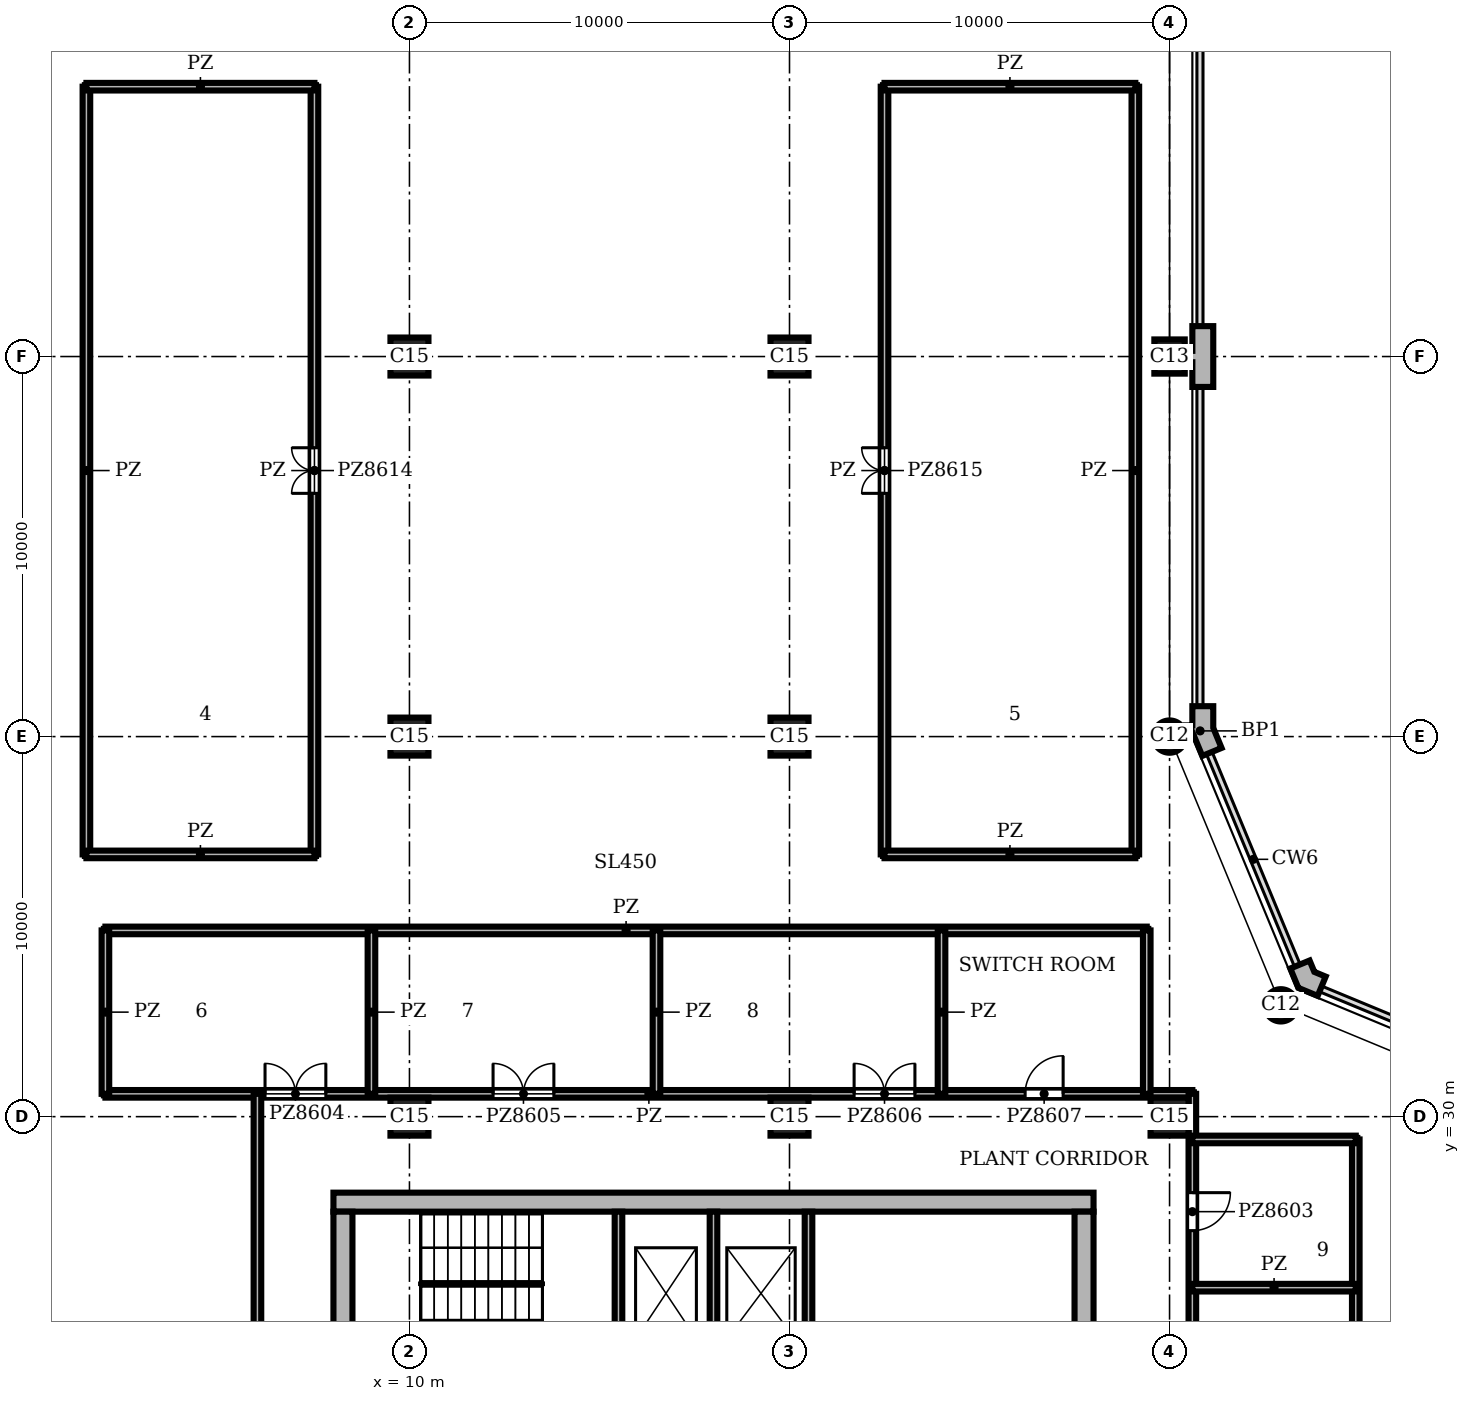
"""IFC4 building model, lengths in metres.
Left out: names, types, materials, properties, quantities, classifications, styles, units other than length and angle.
Written with IfcOpenShell. Run it as: python <this file> out.ifc"""

import sys

from ifc_helpers import new_model, si_unit, direction, frame, frame_2d, origin, origin_2d, place, context, subcontext, project, spatial, polyline, rectangle, circle, outline, extrude, element, fill, save


model = new_model("IFC4")
c1 = context("Model", 3, precision=1e-05, world=origin(), true_north=direction((0.0, 1.0)))
c2 = subcontext(c1, "Body", "Model", "MODEL_VIEW")
j1 = project(units=[si_unit("LENGTHUNIT", "METRE"), si_unit("PLANEANGLEUNIT", "RADIAN")], contexts=[c1])
p1 = place(None, origin())
s1 = spatial("IfcSite", under=j1, at=p1, CompositionType="ELEMENT")
p2 = place(p1, origin())
s2 = spatial("IfcBuilding", under=s1, at=p2, CompositionType="ELEMENT")
p3 = place(p2, frame((0.0, 0.0, 352.8)))
s3 = spatial("IfcBuildingStorey", under=s2, at=p3, CompositionType="ELEMENT", Elevation=352.8)
for number, where, z_axis, x_axis in (
    (1, (32.929, 32.929, 0.0), (0.0, 0.0, 1.0), (1.0, 0.0, 0.0)),
    (2, (30.0, 40.0, 0.0), (0.0, 0.0, 1.0), (1.0, 0.0, 0.0)),
):
    element("IfcColumn", number, at=place(p3, frame(where, z_axis=z_axis, x_axis=x_axis)), inside=s3, PredefinedType="COLUMN", context=c2, shape_type="SweptSolid", body=[
        extrude(circle(Radius=0.425, at=origin_2d()), origin(), (0.0, 0.0, 1.0), 5.4),
    ])
p4 = place(p3, frame((30.0, 50.0, 0.0), z_axis=(0.0, 0.0, 1.0), x_axis=(0.0, 1.0, 0.0)))
e3 = element("IfcColumn", 3, at=p4, inside=s3, PredefinedType="COLUMN", context=c2, shape_type="SweptSolid", body=[
    extrude(rectangle(XDim=0.9, YDim=0.8, at=origin_2d()), origin(), (0.0, 0.0, 1.0), 5.4),
])
for number, where, z_axis, x_axis in (
    (4, (10.0, 30.0, 0.0), (0.0, 0.0, 1.0), (1.0, 0.0, 0.0)),
    (5, (10.0, 40.0, 0.0), (0.0, 0.0, 1.0), (1.0, 0.0, 0.0)),
    (6, (10.0, 50.0, 0.0), (0.0, 0.0, 1.0), (1.0, 0.0, 0.0)),
    (7, (20.0, 30.0, 0.0), (0.0, 0.0, 1.0), (1.0, 0.0, 0.0)),
    (8, (20.0, 40.0, 0.0), (0.0, 0.0, 1.0), (1.0, 0.0, 0.0)),
    (9, (20.0, 50.0, 0.0), (0.0, 0.0, 1.0), (1.0, 0.0, 0.0)),
    (10, (30.0, 30.0, 0.0), (0.0, 0.0, 1.0), (1.0, 0.0, 0.0)),
):
    element("IfcColumn", number, at=place(p3, frame(where, z_axis=z_axis, x_axis=x_axis)), inside=s3, PredefinedType="COLUMN", context=c2, shape_type="SweptSolid", body=[
        extrude(rectangle(XDim=1.0, YDim=1.0, at=origin_2d()), origin(), (0.0, 0.0, 1.0), 5.4),
    ])
p5 = place(p3, frame((27.75, 8.5, 0.0), z_axis=(0.0, 0.0, 1.0), x_axis=(0.0, 1.0, 0.0)))
e11 = element("IfcWall", 11, at=p5, inside=s3, PredefinedType="SHEAR", context=c2, shape_type="SweptSolid", body=[
    extrude(rectangle(XDim=19.0, YDim=0.5, at=frame_2d((9.5, 0.0))), origin(), (0.0, 0.0, 1.0), 5.4),
])
p6 = place(p5, frame((4.95, 0.0, 0.0)))
e12 = element("IfcOpeningElement", 12, at=p6, cuts=e11, PredefinedType="OPENING", context=c2, shape_type="SweptSolid", body=[
    extrude(rectangle(XDim=1.6, YDim=2.1, at=frame_2d((0.8, 1.05))), frame((0.0, 0.26, 0.0), z_axis=(0.0, -1.0, 0.0), x_axis=(1.0, 0.0, 0.0)), (0.0, 0.0, 1.0), 0.52),
])
p7 = place(p3, frame((28.0, 27.75, 0.0), z_axis=(0.0, 0.0, 1.0), x_axis=(-1.0, 0.0, 0.0)))
e13 = element("IfcWall", 13, at=p7, inside=s3, PredefinedType="SHEAR", context=c2, shape_type="SweptSolid", body=[
    extrude(rectangle(XDim=20.0, YDim=0.5, at=frame_2d((10.0, 0.0))), origin(), (0.0, 0.0, 1.0), 5.4),
])
p8 = place(p3, frame((8.25, 27.5, 0.0), z_axis=(0.0, 0.0, 1.0), x_axis=(0.0, -1.0, 0.0)))
e14 = element("IfcWall", 14, at=p8, inside=s3, PredefinedType="SHEAR", context=c2, shape_type="SweptSolid", body=[
    extrude(rectangle(XDim=19.0, YDim=0.5, at=frame_2d((9.5, 0.0))), origin(), (0.0, 0.0, 1.0), 5.4),
])
p9 = place(p3, origin())
e15 = element("IfcWall", 15, at=p9, inside=s3, PredefinedType="SOLIDWALL", context=c2, shape_type="SweptSolid", body=[
    extrude(outline(polyline([(34.051, 33.547), (34.108, 33.685), (33.809, 33.809), (33.685, 34.108), (33.547, 34.051), (33.177, 33.898), (33.388, 33.388), (33.898, 33.177), (34.051, 33.547)])), origin(), (0.0, 0.0, 1.0), 5.4),
])
e16 = element("IfcWall", 16, at=p9, inside=s3, PredefinedType="SOLIDWALL", context=c2, shape_type="SweptSolid", body=[
    extrude(outline(polyline([(30.62, 39.995), (30.62, 40.071), (30.861, 39.49), (31.23, 39.644), (31.369, 39.701), (31.15, 40.229), (31.15, 40.8), (31.0, 40.8), (30.6, 40.8), (30.6, 40.295), (30.425, 40.295), (30.425, 39.995), (30.62, 39.995)])), origin(), (0.0, 0.0, 1.0), 5.4),
])
e17 = element("IfcWall", 17, at=p9, inside=s3, PredefinedType="SOLIDWALL", context=c2, shape_type="SweptSolid", body=[
    extrude(outline(polyline([(30.0, 49.85), (30.6, 49.85), (30.6, 49.2), (31.0, 49.2), (31.15, 49.2), (31.15, 50.0), (31.15, 50.8), (31.0, 50.8), (30.6, 50.8), (30.6, 50.15), (30.0, 50.15), (30.0, 49.85)])), origin(), (0.0, 0.0, 1.0), 5.4),
])
p10 = place(p3, frame((15.5, 23.6, 0.0), z_axis=(0.0, 0.0, 1.0), x_axis=(0.0, 1.0, 0.0)))
e18 = element("IfcWall", 18, at=p10, inside=s3, PredefinedType="SHEAR", context=c2, shape_type="SweptSolid", body=[
    extrude(rectangle(XDim=3.9, YDim=0.2, at=frame_2d((1.95, 0.0))), origin(), (0.0, 0.0, 1.0), 5.0),
])
p11 = place(p3, frame((18.0, 20.0, 0.0), z_axis=(0.0, 0.0, 1.0), x_axis=(0.0, 1.0, 0.0)))
e19 = element("IfcWall", 19, at=p11, inside=s3, PredefinedType="SHEAR", context=c2, shape_type="SweptSolid", body=[
    extrude(rectangle(XDim=7.5, YDim=0.2, at=frame_2d((3.75, 0.0))), origin(), (0.0, 0.0, 1.0), 5.0),
])
p12 = place(p11, frame((1.2, 0.0, 0.0)))
e20 = element("IfcOpeningElement", 20, at=p12, cuts=e19, PredefinedType="OPENING", context=c2, shape_type="SweptSolid", body=[
    extrude(rectangle(XDim=1.2, YDim=2.1, at=frame_2d((0.6, 1.05))), frame((0.0, 0.11, 0.0), z_axis=(0.0, -1.0, 0.0), x_axis=(1.0, 0.0, 0.0)), (0.0, 0.0, 1.0), 0.22),
])
p13 = place(p3, frame((20.5, 23.6, 0.0), z_axis=(0.0, 0.0, 1.0), x_axis=(0.0, 1.0, 0.0)))
e21 = element("IfcWall", 21, at=p13, inside=s3, PredefinedType="SHEAR", context=c2, shape_type="SweptSolid", body=[
    extrude(rectangle(XDim=3.9, YDim=0.2, at=frame_2d((1.95, 0.0))), origin(), (0.0, 0.0, 1.0), 5.0),
])
for number, where, z_axis, x_axis in (
    (22, (1.5, 36.9, 0.0), (0.0, 0.0, 1.0), (1.0, 0.0, 0.0)),
    (23, (1.5, 57.1, 0.0), (0.0, 0.0, 1.0), (1.0, 0.0, 0.0)),
):
    element("IfcWall", number, at=place(p3, frame(where, z_axis=z_axis, x_axis=x_axis)), inside=s3, PredefinedType="PARTITIONING", context=c2, shape_type="SweptSolid", body=[
        extrude(rectangle(XDim=6.0, YDim=0.2, at=frame_2d((3.0, 0.0))), origin(), (0.0, 0.0, 1.0), 5.0),
    ])
p14 = place(p3, frame((2.0, 30.6, 0.0), z_axis=(0.0, 0.0, 1.0), x_axis=(1.0, 0.0, 0.0)))
e24 = element("IfcWall", 24, at=p14, inside=s3, PredefinedType="PARTITIONING", context=c2, shape_type="SweptSolid", body=[
    extrude(rectangle(XDim=28.6, YDim=0.2, at=frame_2d((14.3, 0.0))), origin(), (0.0, 0.0, 1.0), 5.0),
])
p15 = place(p14, frame((4.2, 0.0, 0.0)))
e25 = element("IfcOpeningElement", 25, at=p15, cuts=e24, PredefinedType="OPENING", context=c2, shape_type="SweptSolid", body=[
    extrude(rectangle(XDim=1.6, YDim=2.1, at=frame_2d((0.8, 1.05))), frame((0.0, 0.11, 0.0), z_axis=(0.0, -1.0, 0.0), x_axis=(1.0, 0.0, 0.0)), (0.0, 0.0, 1.0), 0.22),
])
p16 = place(p14, frame((10.2, 0.0, 0.0)))
e26 = element("IfcOpeningElement", 26, at=p16, cuts=e24, PredefinedType="OPENING", context=c2, shape_type="SweptSolid", body=[
    extrude(rectangle(XDim=1.6, YDim=2.1, at=frame_2d((0.8, 1.05))), frame((0.0, 0.11, 0.0), z_axis=(0.0, -1.0, 0.0), x_axis=(1.0, 0.0, 0.0)), (0.0, 0.0, 1.0), 0.22),
])
p17 = place(p14, frame((19.7, 0.0, 0.0)))
e27 = element("IfcOpeningElement", 27, at=p17, cuts=e24, PredefinedType="OPENING", context=c2, shape_type="SweptSolid", body=[
    extrude(rectangle(XDim=1.6, YDim=2.1, at=frame_2d((0.8, 1.05))), frame((0.0, 0.11, 0.0), z_axis=(0.0, -1.0, 0.0), x_axis=(1.0, 0.0, 0.0)), (0.0, 0.0, 1.0), 0.22),
])
p18 = place(p14, frame((24.2, 0.0, 0.0)))
e28 = element("IfcOpeningElement", 28, at=p18, cuts=e24, PredefinedType="OPENING", context=c2, shape_type="SweptSolid", body=[
    extrude(rectangle(XDim=1.0, YDim=2.1, at=frame_2d((0.5, 1.05))), frame((0.0, 0.11, 0.0), z_axis=(0.0, -1.0, 0.0), x_axis=(1.0, 0.0, 0.0)), (0.0, 0.0, 1.0), 0.22),
])
p19 = place(p3, frame((2.0, 34.9, 0.0), z_axis=(0.0, 0.0, 1.0), x_axis=(1.0, 0.0, 0.0)))
e29 = element("IfcWall", 29, at=p19, inside=s3, PredefinedType="PARTITIONING", context=c2, shape_type="SweptSolid", body=[
    extrude(rectangle(XDim=27.4, YDim=0.2, at=frame_2d((13.7, 0.0))), origin(), (0.0, 0.0, 1.0), 5.0),
])
for number, where, z_axis, x_axis in (
    (30, (22.5, 36.9, 0.0), (0.0, 0.0, 1.0), (1.0, 0.0, 0.0)),
    (31, (22.5, 57.1, 0.0), (0.0, 0.0, 1.0), (1.0, 0.0, 0.0)),
):
    element("IfcWall", number, at=place(p3, frame(where, z_axis=z_axis, x_axis=x_axis)), inside=s3, PredefinedType="PARTITIONING", context=c2, shape_type="SweptSolid", body=[
        extrude(rectangle(XDim=6.6, YDim=0.2, at=frame_2d((3.3, 0.0))), origin(), (0.0, 0.0, 1.0), 5.0),
    ])
for number, where, z_axis, x_axis in (
    (32, (30.6, 25.5, 0.0), (0.0, 0.0, 1.0), (1.0, 0.0, 0.0)),
    (33, (30.6, 29.4, 0.0), (0.0, 0.0, 1.0), (1.0, 0.0, 0.0)),
):
    element("IfcWall", number, at=place(p3, frame(where, z_axis=z_axis, x_axis=x_axis)), inside=s3, PredefinedType="PARTITIONING", context=c2, shape_type="SweptSolid", body=[
        extrude(rectangle(XDim=4.3, YDim=0.2, at=frame_2d((2.15, 0.0))), origin(), (0.0, 0.0, 1.0), 5.0),
    ])
p20 = place(p3, frame((1.5, 36.9, 0.0), z_axis=(0.0, 0.0, 1.0), x_axis=(0.0, 1.0, 0.0)))
e34 = element("IfcWall", 34, at=p20, inside=s3, PredefinedType="PARTITIONING", context=c2, shape_type="SweptSolid", body=[
    extrude(rectangle(XDim=20.2, YDim=0.2, at=frame_2d((10.1, 0.0))), origin(), (0.0, 0.0, 1.0), 5.0),
])
p21 = place(p3, frame((2.0, 30.6, 0.0), z_axis=(0.0, 0.0, 1.0), x_axis=(0.0, 1.0, 0.0)))
e35 = element("IfcWall", 35, at=p21, inside=s3, PredefinedType="PARTITIONING", context=c2, shape_type="SweptSolid", body=[
    extrude(rectangle(XDim=4.3, YDim=0.2, at=frame_2d((2.15, 0.0))), origin(), (0.0, 0.0, 1.0), 5.0),
])
p22 = place(p3, frame((6.0, 14.0, 0.0), z_axis=(0.0, 0.0, 1.0), x_axis=(0.0, 1.0, 0.0)))
e36 = element("IfcWall", 36, at=p22, inside=s3, PredefinedType="PARTITIONING", context=c2, shape_type="SweptSolid", body=[
    extrude(rectangle(XDim=16.6, YDim=0.2, at=frame_2d((8.3, 0.0))), origin(), (0.0, 0.0, 1.0), 5.0),
])
p23 = place(p3, frame((7.5, 36.9, 0.0), z_axis=(0.0, 0.0, 1.0), x_axis=(0.0, 1.0, 0.0)))
e37 = element("IfcWall", 37, at=p23, inside=s3, PredefinedType="PARTITIONING", context=c2, shape_type="SweptSolid", body=[
    extrude(rectangle(XDim=20.2, YDim=0.2, at=frame_2d((10.1, 0.0))), origin(), (0.0, 0.0, 1.0), 5.0),
])
p24 = place(p23, frame((9.5, 0.0, 0.0)))
e38 = element("IfcOpeningElement", 38, at=p24, cuts=e37, PredefinedType="OPENING", context=c2, shape_type="SweptSolid", body=[
    extrude(rectangle(XDim=1.2, YDim=2.1, at=frame_2d((0.6, 1.05))), frame((0.0, 0.11, 0.0), z_axis=(0.0, -1.0, 0.0), x_axis=(1.0, 0.0, 0.0)), (0.0, 0.0, 1.0), 0.22),
])
for number, where, z_axis, x_axis in (
    (39, (9.0, 30.6, 0.0), (0.0, 0.0, 1.0), (0.0, 1.0, 0.0)),
    (40, (16.5, 30.6, 0.0), (0.0, 0.0, 1.0), (0.0, 1.0, 0.0)),
):
    element("IfcWall", number, at=place(p3, frame(where, z_axis=z_axis, x_axis=x_axis)), inside=s3, PredefinedType="PARTITIONING", context=c2, shape_type="SweptSolid", body=[
        extrude(rectangle(XDim=4.3, YDim=0.2, at=frame_2d((2.15, 0.0))), origin(), (0.0, 0.0, 1.0), 5.0),
    ])
p25 = place(p3, frame((22.5, 36.9, 0.0), z_axis=(0.0, 0.0, 1.0), x_axis=(0.0, 1.0, 0.0)))
e41 = element("IfcWall", 41, at=p25, inside=s3, PredefinedType="PARTITIONING", context=c2, shape_type="SweptSolid", body=[
    extrude(rectangle(XDim=20.2, YDim=0.2, at=frame_2d((10.1, 0.0))), origin(), (0.0, 0.0, 1.0), 5.0),
])
p26 = place(p25, frame((9.5, 0.0, 0.0)))
e42 = element("IfcOpeningElement", 42, at=p26, cuts=e41, PredefinedType="OPENING", context=c2, shape_type="SweptSolid", body=[
    extrude(rectangle(XDim=1.2, YDim=2.1, at=frame_2d((0.6, 1.05))), frame((0.0, 0.11, 0.0), z_axis=(0.0, -1.0, 0.0), x_axis=(1.0, 0.0, 0.0)), (0.0, 0.0, 1.0), 0.22),
])
p27 = place(p3, frame((24.0, 30.6, 0.0), z_axis=(0.0, 0.0, 1.0), x_axis=(0.0, 1.0, 0.0)))
e43 = element("IfcWall", 43, at=p27, inside=s3, PredefinedType="PARTITIONING", context=c2, shape_type="SweptSolid", body=[
    extrude(rectangle(XDim=4.3, YDim=0.2, at=frame_2d((2.15, 0.0))), origin(), (0.0, 0.0, 1.0), 5.0),
])
p28 = place(p3, frame((29.1, 36.9, 0.0), z_axis=(0.0, 0.0, 1.0), x_axis=(0.0, 1.0, 0.0)))
e44 = element("IfcWall", 44, at=p28, inside=s3, PredefinedType="PARTITIONING", context=c2, shape_type="SweptSolid", body=[
    extrude(rectangle(XDim=20.2, YDim=0.2, at=frame_2d((10.1, 0.0))), origin(), (0.0, 0.0, 1.0), 5.0),
])
p29 = place(p3, frame((29.4, 30.6, 0.0), z_axis=(0.0, 0.0, 1.0), x_axis=(0.0, 1.0, 0.0)))
e45 = element("IfcWall", 45, at=p29, inside=s3, PredefinedType="PARTITIONING", context=c2, shape_type="SweptSolid", body=[
    extrude(rectangle(XDim=4.3, YDim=0.2, at=frame_2d((2.15, 0.0))), origin(), (0.0, 0.0, 1.0), 5.0),
])
p30 = place(p3, frame((30.6, 8.1, 0.0), z_axis=(0.0, 0.0, 1.0), x_axis=(0.0, 1.0, 0.0)))
e46 = element("IfcWall", 46, at=p30, inside=s3, PredefinedType="PARTITIONING", context=c2, shape_type="SweptSolid", body=[
    extrude(rectangle(XDim=22.5, YDim=0.2, at=frame_2d((11.25, 0.0))), origin(), (0.0, 0.0, 1.0), 5.0),
])
p31 = place(p30, frame((5.1, 0.0, 0.0)))
e47 = element("IfcOpeningElement", 47, at=p31, cuts=e46, PredefinedType="OPENING", context=c2, shape_type="SweptSolid", body=[
    extrude(rectangle(XDim=1.6, YDim=2.1, at=frame_2d((0.8, 1.05))), frame((0.0, 0.11, 0.0), z_axis=(0.0, -1.0, 0.0), x_axis=(1.0, 0.0, 0.0)), (0.0, 0.0, 1.0), 0.22),
])
p32 = place(p30, frame((14.5, 0.0, 0.0)))
e48 = element("IfcOpeningElement", 48, at=p32, cuts=e46, PredefinedType="OPENING", context=c2, shape_type="SweptSolid", body=[
    extrude(rectangle(XDim=1.2, YDim=2.1, at=frame_2d((0.6, 1.05))), frame((0.0, 0.11, 0.0), z_axis=(0.0, -1.0, 0.0), x_axis=(1.0, 0.0, 0.0)), (0.0, 0.0, 1.0), 0.22),
])
p33 = place(p30, frame((18.9, 0.0, 0.0)))
e49 = element("IfcOpeningElement", 49, at=p33, cuts=e46, PredefinedType="OPENING", context=c2, shape_type="SweptSolid", body=[
    extrude(rectangle(XDim=1.0, YDim=2.1, at=frame_2d((0.5, 1.05))), frame((0.0, 0.11, 0.0), z_axis=(0.0, -1.0, 0.0), x_axis=(1.0, 0.0, 0.0)), (0.0, 0.0, 1.0), 0.22),
])
p34 = place(p3, frame((34.9, 8.1, 0.0), z_axis=(0.0, 0.0, 1.0), x_axis=(0.0, 1.0, 0.0)))
e50 = element("IfcWall", 50, at=p34, inside=s3, PredefinedType="PARTITIONING", context=c2, shape_type="SweptSolid", body=[
    extrude(rectangle(XDim=21.3, YDim=0.2, at=frame_2d((10.65, 0.0))), origin(), (0.0, 0.0, 1.0), 5.0),
])
p35 = place(p33, frame((1.0, 0.0, 0.0), z_axis=(0.0, 0.0, 1.0), x_axis=(-1.0, 0.0, 0.0)))
e51 = element("IfcDoor", 51, at=p35, inside=s3, OperationType="SINGLE_SWING_LEFT", PredefinedType="DOOR", context=c2, shape_type="SweptSolid", body=[
    extrude(rectangle(XDim=1.0, YDim=2.1, at=frame_2d((0.5, 1.05))), frame((0.0, 0.025, 0.0), z_axis=(0.0, -1.0, 0.0), x_axis=(1.0, 0.0, 0.0)), (0.0, 0.0, 1.0), 0.05),
])
fill(e49, e51)
p36 = place(p15, origin())
e52 = element("IfcDoor", 52, at=p36, inside=s3, OperationType="DOUBLE_DOOR_DOUBLE_SWING", PredefinedType="DOOR", context=c2, shape_type="SweptSolid", body=[
    extrude(rectangle(XDim=1.6, YDim=2.1, at=frame_2d((0.8, 1.05))), frame((0.0, 0.025, 0.0), z_axis=(0.0, -1.0, 0.0), x_axis=(1.0, 0.0, 0.0)), (0.0, 0.0, 1.0), 0.05),
])
fill(e25, e52)
p37 = place(p16, origin())
e53 = element("IfcDoor", 53, at=p37, inside=s3, OperationType="DOUBLE_DOOR_DOUBLE_SWING", PredefinedType="DOOR", context=c2, shape_type="SweptSolid", body=[
    extrude(rectangle(XDim=1.6, YDim=2.1, at=frame_2d((0.8, 1.05))), frame((0.0, 0.025, 0.0), z_axis=(0.0, -1.0, 0.0), x_axis=(1.0, 0.0, 0.0)), (0.0, 0.0, 1.0), 0.05),
])
fill(e26, e53)
p38 = place(p17, origin())
e54 = element("IfcDoor", 54, at=p38, inside=s3, OperationType="DOUBLE_DOOR_DOUBLE_SWING", PredefinedType="DOOR", context=c2, shape_type="SweptSolid", body=[
    extrude(rectangle(XDim=1.6, YDim=2.1, at=frame_2d((0.8, 1.05))), frame((0.0, 0.025, 0.0), z_axis=(0.0, -1.0, 0.0), x_axis=(1.0, 0.0, 0.0)), (0.0, 0.0, 1.0), 0.05),
])
fill(e27, e54)
p39 = place(p18, origin())
e55 = element("IfcDoor", 55, at=p39, inside=s3, OperationType="SINGLE_SWING_RIGHT", PredefinedType="DOOR", context=c2, shape_type="SweptSolid", body=[
    extrude(rectangle(XDim=1.0, YDim=2.1, at=frame_2d((0.5, 1.05))), frame((0.0, 0.025, 0.0), z_axis=(0.0, -1.0, 0.0), x_axis=(1.0, 0.0, 0.0)), (0.0, 0.0, 1.0), 0.05),
])
fill(e28, e55)
p40 = place(p24, origin())
e56 = element("IfcDoor", 56, at=p40, inside=s3, OperationType="DOUBLE_DOOR_SINGLE_SWING", PredefinedType="DOOR", context=c2, shape_type="SweptSolid", body=[
    extrude(rectangle(XDim=1.2, YDim=2.1, at=frame_2d((0.6, 1.05))), frame((0.0, 0.025, 0.0), z_axis=(0.0, -1.0, 0.0), x_axis=(1.0, 0.0, 0.0)), (0.0, 0.0, 1.0), 0.05),
])
fill(e38, e56)
p41 = place(p26, origin())
e57 = element("IfcDoor", 57, at=p41, inside=s3, OperationType="DOUBLE_DOOR_SINGLE_SWING", PredefinedType="DOOR", context=c2, shape_type="SweptSolid", body=[
    extrude(rectangle(XDim=1.2, YDim=2.1, at=frame_2d((0.6, 1.05))), frame((0.0, 0.025, 0.0), z_axis=(0.0, -1.0, 0.0), x_axis=(1.0, 0.0, 0.0)), (0.0, 0.0, 1.0), 0.05),
])
fill(e42, e57)
save(model, sys.argv[1])
